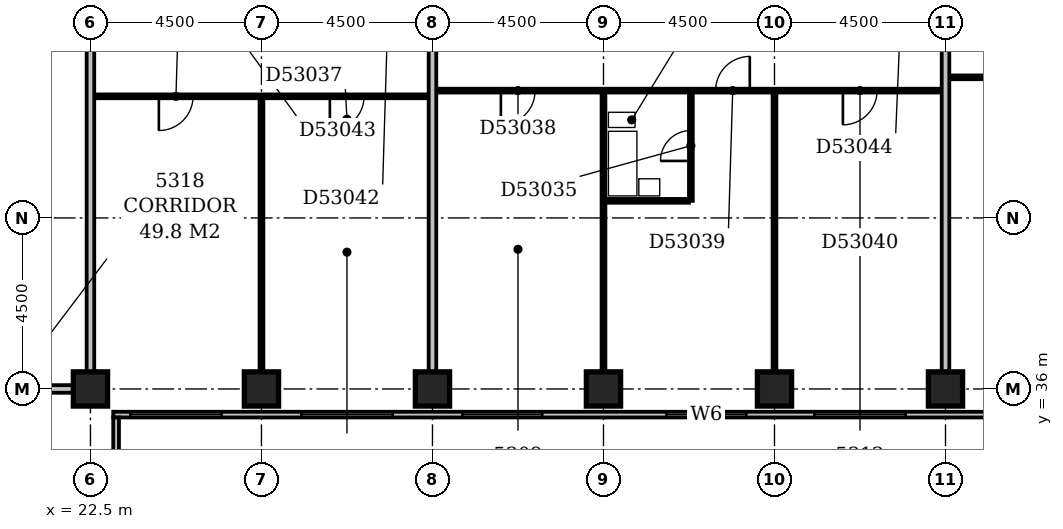
"""IFC4 building model, lengths in metres.
Left out: names, types, materials, properties, quantities, classifications, styles, units other than length and angle.
Written with IfcOpenShell. Run it as: python <this file> out.ifc"""

import sys

from ifc_helpers import new_model, si_unit, direction, frame, frame_2d, origin, origin_2d, place, context, subcontext, project, spatial, rectangle, extrude, element, fill, save


model = new_model("IFC4")
c1 = context("Model", 3, precision=1e-05, world=origin(), true_north=direction((0.0, 1.0)))
c2 = subcontext(c1, "Body", "Model", "MODEL_VIEW")
j1 = project(units=[si_unit("LENGTHUNIT", "METRE"), si_unit("PLANEANGLEUNIT", "RADIAN")], contexts=[c1])
p1 = place(None, origin())
s1 = spatial("IfcSite", under=j1, at=p1, CompositionType="ELEMENT")
p2 = place(p1, origin())
s2 = spatial("IfcBuilding", under=s1, at=p2, CompositionType="ELEMENT")
p3 = place(p2, frame((0.0, 0.0, 207.8)))
s3 = spatial("IfcBuildingStorey", under=s2, at=p3, CompositionType="ELEMENT", Elevation=207.8)
for number, where, z_axis, x_axis in (
    (1, (22.5, 36.0, -0.3), (0.0, 0.0, 1.0), (1.0, 0.0, 0.0)),
    (2, (27.0, 36.0, -0.3), (0.0, 0.0, 1.0), (1.0, 0.0, 0.0)),
    (3, (31.5, 36.0, -0.3), (0.0, 0.0, 1.0), (1.0, 0.0, 0.0)),
    (4, (36.0, 36.0, -0.3), (0.0, 0.0, 1.0), (1.0, 0.0, 0.0)),
    (5, (40.5, 36.0, -0.3), (0.0, 0.0, 1.0), (1.0, 0.0, 0.0)),
    (6, (45.0, 36.0, -0.3), (0.0, 0.0, 1.0), (1.0, 0.0, 0.0)),
):
    element("IfcColumn", number, at=place(p3, frame(where, z_axis=z_axis, x_axis=x_axis)), inside=s3, PredefinedType="COLUMN", context=c2, shape_type="SweptSolid", body=[
        extrude(rectangle(XDim=0.9, YDim=0.9, at=origin_2d()), origin(), (0.0, 0.0, 1.0), 3.55),
    ])
p4 = place(p3, frame((23.175, 17.4, 0.0), z_axis=(0.0, 0.0, 1.0), x_axis=(0.0, 1.0, 0.0)))
e7 = element("IfcWall", 7, at=p4, inside=s3, PredefinedType="STANDARD", context=c2, shape_type="SweptSolid", body=[
    extrude(rectangle(XDim=17.85, YDim=0.15, at=frame_2d((8.925, 0.0))), origin(), (0.0, 0.0, 1.0), 2.7),
])
p5 = place(p4, frame((1.65, 0.0, 0.6)))
e8 = element("IfcOpeningElement", 8, at=p5, cuts=e7, PredefinedType="OPENING", context=c2, shape_type="SweptSolid", body=[
    extrude(rectangle(XDim=2.4, YDim=1.8, at=frame_2d((1.2, 0.9))), frame((0.0, 0.087, 0.0), z_axis=(0.0, -1.0, 0.0), x_axis=(1.0, 0.0, 0.0)), (0.0, 0.0, 1.0), 0.174),
])
p6 = place(p4, frame((6.15, 0.0, 0.6)))
e9 = element("IfcOpeningElement", 9, at=p6, cuts=e7, PredefinedType="OPENING", context=c2, shape_type="SweptSolid", body=[
    extrude(rectangle(XDim=2.4, YDim=1.8, at=frame_2d((1.2, 0.9))), frame((0.0, 0.087, 0.0), z_axis=(0.0, -1.0, 0.0), x_axis=(1.0, 0.0, 0.0)), (0.0, 0.0, 1.0), 0.174),
])
p7 = place(p4, frame((10.65, 0.0, 0.6)))
e10 = element("IfcOpeningElement", 10, at=p7, cuts=e7, PredefinedType="OPENING", context=c2, shape_type="SweptSolid", body=[
    extrude(rectangle(XDim=2.4, YDim=1.8, at=frame_2d((1.2, 0.9))), frame((0.0, 0.087, 0.0), z_axis=(0.0, -1.0, 0.0), x_axis=(1.0, 0.0, 0.0)), (0.0, 0.0, 1.0), 0.174),
])
p8 = place(p4, frame((14.787, 0.0, 0.6)))
e11 = element("IfcOpeningElement", 11, at=p8, cuts=e7, PredefinedType="OPENING", context=c2, shape_type="SweptSolid", body=[
    extrude(rectangle(XDim=0.9, YDim=1.8, at=frame_2d((0.45, 0.9))), frame((0.0, 0.087, 0.0), z_axis=(0.0, -1.0, 0.0), x_axis=(1.0, 0.0, 0.0)), (0.0, 0.0, 1.0), 0.174),
])
p9 = place(p3, frame((23.1, 35.325, 0.0), z_axis=(0.0, 0.0, 1.0), x_axis=(1.0, 0.0, 0.0)))
e12 = element("IfcWall", 12, at=p9, inside=s3, PredefinedType="STANDARD", context=c2, shape_type="SweptSolid", body=[
    extrude(rectangle(XDim=27.15, YDim=0.15, at=frame_2d((13.575, 0.0))), origin(), (0.0, 0.0, 1.0), 2.7),
])
p10 = place(p9, frame((0.45, 0.0, 0.6)))
e13 = element("IfcOpeningElement", 13, at=p10, cuts=e12, PredefinedType="OPENING", context=c2, shape_type="SweptSolid", body=[
    extrude(rectangle(XDim=2.4, YDim=1.8, at=frame_2d((1.2, 0.9))), frame((0.0, 0.087, 0.0), z_axis=(0.0, -1.0, 0.0), x_axis=(1.0, 0.0, 0.0)), (0.0, 0.0, 1.0), 0.174),
])
p11 = place(p9, frame((4.95, 0.0, 0.6)))
e14 = element("IfcOpeningElement", 14, at=p11, cuts=e12, PredefinedType="OPENING", context=c2, shape_type="SweptSolid", body=[
    extrude(rectangle(XDim=2.4, YDim=1.8, at=frame_2d((1.2, 0.9))), frame((0.0, 0.087, 0.0), z_axis=(0.0, -1.0, 0.0), x_axis=(1.0, 0.0, 0.0)), (0.0, 0.0, 1.0), 0.174),
])
p12 = place(p9, frame((9.189, 0.0, 0.6)))
e15 = element("IfcOpeningElement", 15, at=p12, cuts=e12, PredefinedType="OPENING", context=c2, shape_type="SweptSolid", body=[
    extrude(rectangle(XDim=2.1, YDim=1.8, at=frame_2d((1.05, 0.9))), frame((0.0, 0.087, 0.0), z_axis=(0.0, -1.0, 0.0), x_axis=(1.0, 0.0, 0.0)), (0.0, 0.0, 1.0), 0.174),
])
p13 = place(p9, frame((14.558, 0.0, 0.6)))
e16 = element("IfcOpeningElement", 16, at=p13, cuts=e12, PredefinedType="OPENING", context=c2, shape_type="SweptSolid", body=[
    extrude(rectangle(XDim=2.1, YDim=1.8, at=frame_2d((1.05, 0.9))), frame((0.0, 0.087, 0.0), z_axis=(0.0, -1.0, 0.0), x_axis=(1.0, 0.0, 0.0)), (0.0, 0.0, 1.0), 0.174),
])
p14 = place(p9, frame((18.45, 0.0, 0.6)))
e17 = element("IfcOpeningElement", 17, at=p14, cuts=e12, PredefinedType="OPENING", context=c2, shape_type="SweptSolid", body=[
    extrude(rectangle(XDim=2.4, YDim=1.8, at=frame_2d((1.2, 0.9))), frame((0.0, 0.087, 0.0), z_axis=(0.0, -1.0, 0.0), x_axis=(1.0, 0.0, 0.0)), (0.0, 0.0, 1.0), 0.174),
])
p15 = place(p9, frame((22.95, 0.0, 0.6)))
e18 = element("IfcOpeningElement", 18, at=p15, cuts=e12, PredefinedType="OPENING", context=c2, shape_type="SweptSolid", body=[
    extrude(rectangle(XDim=2.4, YDim=1.8, at=frame_2d((1.2, 0.9))), frame((0.0, 0.087, 0.0), z_axis=(0.0, -1.0, 0.0), x_axis=(1.0, 0.0, 0.0)), (0.0, 0.0, 1.0), 0.174),
])
p16 = place(p3, frame((9.1, 36.0, 0.0), z_axis=(0.0, 0.0, 1.0), x_axis=(1.0, 0.0, 0.0)))
e19 = element("IfcWall", 19, at=p16, inside=s3, PredefinedType="PARTITIONING", context=c2, shape_type="SweptSolid", body=[
    extrude(rectangle(XDim=12.95, YDim=0.2, at=frame_2d((6.475, 0.0))), origin(), (0.0, 0.0, 1.0), 3.25),
])
p17 = place(p3, frame((22.5, 36.45, 0.0), z_axis=(0.0, 0.0, 1.0), x_axis=(0.0, 1.0, 0.0)))
e20 = element("IfcWall", 20, at=p17, inside=s3, PredefinedType="PARTITIONING", context=c2, shape_type="SweptSolid", body=[
    extrude(rectangle(XDim=13.05, YDim=0.2, at=frame_2d((6.525, 0.0))), origin(), (0.0, 0.0, 1.0), 3.25),
])
p18 = place(p3, frame((27.0, 36.45, 0.0), z_axis=(0.0, 0.0, 1.0), x_axis=(0.0, 1.0, 0.0)))
e21 = element("IfcWall", 21, at=p18, inside=s3, PredefinedType="PARTITIONING", context=c2, shape_type="SweptSolid", body=[
    extrude(rectangle(XDim=7.2, YDim=0.1, at=frame_2d((3.6, 0.0))), origin(), (0.0, 0.0, 1.0), 2.35),
])
p19 = place(p3, frame((31.5, 36.45, 0.0), z_axis=(0.0, 0.0, 1.0), x_axis=(0.0, 1.0, 0.0)))
e22 = element("IfcWall", 22, at=p19, inside=s3, PredefinedType="PARTITIONING", context=c2, shape_type="SweptSolid", body=[
    extrude(rectangle(XDim=12.95, YDim=0.2, at=frame_2d((6.475, 0.0))), origin(), (0.0, 0.0, 1.0), 3.25),
])
p20 = place(p3, frame((36.0, 36.45, 0.0), z_axis=(0.0, 0.0, 1.0), x_axis=(0.0, 1.0, 0.0)))
e23 = element("IfcWall", 23, at=p20, inside=s3, PredefinedType="PARTITIONING", context=c2, shape_type="SweptSolid", body=[
    extrude(rectangle(XDim=7.35, YDim=0.1, at=frame_2d((3.675, 0.0))), origin(), (0.0, 0.0, 1.0), 2.35),
])
p21 = place(p3, frame((40.5, 36.45, 0.0), z_axis=(0.0, 0.0, 1.0), x_axis=(0.0, 1.0, 0.0)))
e24 = element("IfcWall", 24, at=p21, inside=s3, PredefinedType="PARTITIONING", context=c2, shape_type="SweptSolid", body=[
    extrude(rectangle(XDim=7.35, YDim=0.1, at=frame_2d((3.675, 0.0))), origin(), (0.0, 0.0, 1.0), 3.25),
])
p22 = place(p3, frame((45.0, 36.45, 0.0), z_axis=(0.0, 0.0, 1.0), x_axis=(0.0, 1.0, 0.0)))
e25 = element("IfcWall", 25, at=p22, inside=s3, PredefinedType="PARTITIONING", context=c2, shape_type="SweptSolid", body=[
    extrude(rectangle(XDim=12.95, YDim=0.2, at=frame_2d((6.475, 0.0))), origin(), (0.0, 0.0, 1.0), 2.55),
])
p23 = place(p3, frame((36.05, 40.95, 0.0), z_axis=(0.0, 0.0, 1.0), x_axis=(1.0, 0.0, 0.0)))
e26 = element("IfcWall", 26, at=p23, inside=s3, PredefinedType="PLUMBINGWALL", context=c2, shape_type="SweptSolid", body=[
    extrude(rectangle(XDim=2.2, YDim=0.1, at=frame_2d((1.1, 0.0))), origin(), (0.0, 0.0, 1.0), 3.25),
])
p24 = place(p3, frame((38.3, 40.95, 0.0), z_axis=(0.0, 0.0, 1.0), x_axis=(0.0, 1.0, 0.0)))
e27 = element("IfcWall", 27, at=p24, inside=s3, PredefinedType="PLUMBINGWALL", context=c2, shape_type="SweptSolid", body=[
    extrude(rectangle(XDim=2.85, YDim=0.1, at=frame_2d((1.425, 0.0))), origin(), (0.0, 0.0, 1.0), 3.25),
])
p25 = place(p24, frame((1.05, 0.0, 0.0)))
e28 = element("IfcOpeningElement", 28, at=p25, cuts=e27, PredefinedType="OPENING", context=c2, shape_type="SweptSolid", body=[
    extrude(rectangle(XDim=0.8, YDim=2.1, at=frame_2d((0.4, 1.05))), frame((0.0, 0.062, 0.0), z_axis=(0.0, -1.0, 0.0), x_axis=(1.0, 0.0, 0.0)), (0.0, 0.0, 1.0), 0.124),
])
p26 = place(p3, frame((22.6, 43.7, 0.0), z_axis=(0.0, 0.0, 1.0), x_axis=(1.0, 0.0, 0.0)))
e29 = element("IfcWall", 29, at=p26, inside=s3, PredefinedType="PARTITIONING", context=c2, shape_type="SweptSolid", body=[
    extrude(rectangle(XDim=8.8, YDim=0.1, at=frame_2d((4.4, 0.0))), origin(), (0.0, 0.0, 1.0), 3.25),
])
p27 = place(p26, frame((1.7, 0.0, 0.0)))
e30 = element("IfcOpeningElement", 30, at=p27, cuts=e29, PredefinedType="OPENING", context=c2, shape_type="SweptSolid", body=[
    extrude(rectangle(XDim=0.9, YDim=2.1, at=frame_2d((0.45, 1.05))), frame((0.0, 0.062, 0.0), z_axis=(0.0, -1.0, 0.0), x_axis=(1.0, 0.0, 0.0)), (0.0, 0.0, 1.0), 0.124),
])
p28 = place(p26, frame((6.2, 0.0, 0.0)))
e31 = element("IfcOpeningElement", 31, at=p28, cuts=e29, PredefinedType="OPENING", context=c2, shape_type="SweptSolid", body=[
    extrude(rectangle(XDim=0.9, YDim=2.1, at=frame_2d((0.45, 1.05))), frame((0.0, 0.062, 0.0), z_axis=(0.0, -1.0, 0.0), x_axis=(1.0, 0.0, 0.0)), (0.0, 0.0, 1.0), 0.124),
])
p29 = place(p3, frame((31.6, 43.85, 0.0), z_axis=(0.0, 0.0, 1.0), x_axis=(1.0, 0.0, 0.0)))
e32 = element("IfcWall", 32, at=p29, inside=s3, PredefinedType="PARTITIONING", context=c2, shape_type="SweptSolid", body=[
    extrude(rectangle(XDim=13.3, YDim=0.1, at=frame_2d((6.65, 0.0))), origin(), (0.0, 0.0, 1.0), 3.25),
])
p30 = place(p29, frame((1.7, 0.0, 0.0)))
e33 = element("IfcOpeningElement", 33, at=p30, cuts=e32, PredefinedType="OPENING", context=c2, shape_type="SweptSolid", body=[
    extrude(rectangle(XDim=0.9, YDim=2.1, at=frame_2d((0.45, 1.05))), frame((0.0, 0.062, 0.0), z_axis=(0.0, -1.0, 0.0), x_axis=(1.0, 0.0, 0.0)), (0.0, 0.0, 1.0), 0.124),
])
p31 = place(p29, frame((7.35, 0.0, 0.0)))
e34 = element("IfcOpeningElement", 34, at=p31, cuts=e32, PredefinedType="OPENING", context=c2, shape_type="SweptSolid", body=[
    extrude(rectangle(XDim=0.9, YDim=2.1, at=frame_2d((0.45, 1.05))), frame((0.0, 0.062, 0.0), z_axis=(0.0, -1.0, 0.0), x_axis=(1.0, 0.0, 0.0)), (0.0, 0.0, 1.0), 0.124),
])
p32 = place(p29, frame((10.7, 0.0, 0.0)))
e35 = element("IfcOpeningElement", 35, at=p32, cuts=e32, PredefinedType="OPENING", context=c2, shape_type="SweptSolid", body=[
    extrude(rectangle(XDim=0.9, YDim=2.1, at=frame_2d((0.45, 1.05))), frame((0.0, 0.062, 0.0), z_axis=(0.0, -1.0, 0.0), x_axis=(1.0, 0.0, 0.0)), (0.0, 0.0, 1.0), 0.124),
])
p33 = place(p3, frame((45.1, 44.2, 0.0), z_axis=(0.0, 0.0, 1.0), x_axis=(1.0, 0.0, 0.0)))
e36 = element("IfcWall", 36, at=p33, inside=s3, PredefinedType="PARTITIONING", context=c2, shape_type="SweptSolid", body=[
    extrude(rectangle(XDim=9.5, YDim=0.1, at=frame_2d((4.75, 0.0))), origin(), (0.0, 0.0, 1.0), 3.25),
])
p34 = place(p33, frame((3.95, 0.0, 0.0)))
e37 = element("IfcOpeningElement", 37, at=p34, cuts=e36, PredefinedType="OPENING", context=c2, shape_type="SweptSolid", body=[
    extrude(rectangle(XDim=0.9, YDim=2.1, at=frame_2d((0.45, 1.05))), frame((0.0, 0.062, 0.0), z_axis=(0.0, -1.0, 0.0), x_axis=(1.0, 0.0, 0.0)), (0.0, 0.0, 1.0), 0.124),
])
p35 = place(p10, origin())
e38 = element("IfcWindow", 38, at=p35, inside=s3, PartitioningType="SINGLE_PANEL", PredefinedType="WINDOW", context=c2, shape_type="SweptSolid", body=[
    extrude(rectangle(XDim=2.4, YDim=1.8, at=frame_2d((1.2, 0.9))), frame((0.0, 0.03, 0.0), z_axis=(0.0, -1.0, 0.0), x_axis=(1.0, 0.0, 0.0)), (0.0, 0.0, 1.0), 0.06),
])
fill(e13, e38)
p36 = place(p11, origin())
e39 = element("IfcWindow", 39, at=p36, inside=s3, PartitioningType="SINGLE_PANEL", PredefinedType="WINDOW", context=c2, shape_type="SweptSolid", body=[
    extrude(rectangle(XDim=2.4, YDim=1.8, at=frame_2d((1.2, 0.9))), frame((0.0, 0.03, 0.0), z_axis=(0.0, -1.0, 0.0), x_axis=(1.0, 0.0, 0.0)), (0.0, 0.0, 1.0), 0.06),
])
fill(e14, e39)
p37 = place(p12, origin())
e40 = element("IfcWindow", 40, at=p37, inside=s3, PartitioningType="SINGLE_PANEL", PredefinedType="WINDOW", context=c2, shape_type="SweptSolid", body=[
    extrude(rectangle(XDim=2.1, YDim=1.8, at=frame_2d((1.05, 0.9))), frame((0.0, 0.03, 0.0), z_axis=(0.0, -1.0, 0.0), x_axis=(1.0, 0.0, 0.0)), (0.0, 0.0, 1.0), 0.06),
])
fill(e15, e40)
p38 = place(p13, origin())
e41 = element("IfcWindow", 41, at=p38, inside=s3, PartitioningType="SINGLE_PANEL", PredefinedType="WINDOW", context=c2, shape_type="SweptSolid", body=[
    extrude(rectangle(XDim=2.1, YDim=1.8, at=frame_2d((1.05, 0.9))), frame((0.0, 0.03, 0.0), z_axis=(0.0, -1.0, 0.0), x_axis=(1.0, 0.0, 0.0)), (0.0, 0.0, 1.0), 0.06),
])
fill(e16, e41)
p39 = place(p14, origin())
e42 = element("IfcWindow", 42, at=p39, inside=s3, PartitioningType="SINGLE_PANEL", PredefinedType="WINDOW", context=c2, shape_type="SweptSolid", body=[
    extrude(rectangle(XDim=2.4, YDim=1.8, at=frame_2d((1.2, 0.9))), frame((0.0, 0.03, 0.0), z_axis=(0.0, -1.0, 0.0), x_axis=(1.0, 0.0, 0.0)), (0.0, 0.0, 1.0), 0.06),
])
fill(e17, e42)
p40 = place(p25, origin())
e43 = element("IfcDoor", 43, at=p40, inside=s3, OperationType="SINGLE_SWING_LEFT", PredefinedType="DOOR", context=c2, shape_type="SweptSolid", body=[
    extrude(rectangle(XDim=0.8, YDim=2.1, at=frame_2d((0.4, 1.05))), frame((0.0, 0.025, 0.0), z_axis=(0.0, -1.0, 0.0), x_axis=(1.0, 0.0, 0.0)), (0.0, 0.0, 1.0), 0.05),
])
fill(e28, e43)
p41 = place(p27, frame((0.9, 0.0, 0.0), z_axis=(0.0, 0.0, 1.0), x_axis=(-1.0, 0.0, 0.0)))
e44 = element("IfcDoor", 44, at=p41, inside=s3, OperationType="SINGLE_SWING_RIGHT", PredefinedType="DOOR", context=c2, shape_type="SweptSolid", body=[
    extrude(rectangle(XDim=0.9, YDim=2.1, at=frame_2d((0.45, 1.05))), frame((0.0, 0.025, 0.0), z_axis=(0.0, -1.0, 0.0), x_axis=(1.0, 0.0, 0.0)), (0.0, 0.0, 1.0), 0.05),
])
fill(e30, e44)
p42 = place(p28, frame((0.9, 0.0, 0.0), z_axis=(0.0, 0.0, 1.0), x_axis=(-1.0, 0.0, 0.0)))
e45 = element("IfcDoor", 45, at=p42, inside=s3, OperationType="SINGLE_SWING_RIGHT", PredefinedType="DOOR", context=c2, shape_type="SweptSolid", body=[
    extrude(rectangle(XDim=0.9, YDim=2.1, at=frame_2d((0.45, 1.05))), frame((0.0, 0.025, 0.0), z_axis=(0.0, -1.0, 0.0), x_axis=(1.0, 0.0, 0.0)), (0.0, 0.0, 1.0), 0.05),
])
fill(e31, e45)
p43 = place(p30, frame((0.9, 0.0, 0.0), z_axis=(0.0, 0.0, 1.0), x_axis=(-1.0, 0.0, 0.0)))
e46 = element("IfcDoor", 46, at=p43, inside=s3, OperationType="SINGLE_SWING_RIGHT", PredefinedType="DOOR", context=c2, shape_type="SweptSolid", body=[
    extrude(rectangle(XDim=0.9, YDim=2.1, at=frame_2d((0.45, 1.05))), frame((0.0, 0.025, 0.0), z_axis=(0.0, -1.0, 0.0), x_axis=(1.0, 0.0, 0.0)), (0.0, 0.0, 1.0), 0.05),
])
fill(e33, e46)
p44 = place(p31, frame((0.9, 0.0, 0.0), z_axis=(0.0, 0.0, 1.0), x_axis=(-1.0, 0.0, 0.0)))
e47 = element("IfcDoor", 47, at=p44, inside=s3, OperationType="SINGLE_SWING_LEFT", PredefinedType="DOOR", context=c2, shape_type="SweptSolid", body=[
    extrude(rectangle(XDim=0.9, YDim=2.1, at=frame_2d((0.45, 1.05))), frame((0.0, 0.025, 0.0), z_axis=(0.0, -1.0, 0.0), x_axis=(1.0, 0.0, 0.0)), (0.0, 0.0, 1.0), 0.05),
])
fill(e34, e47)
p45 = place(p32, frame((0.9, 0.0, 0.0), z_axis=(0.0, 0.0, 1.0), x_axis=(-1.0, 0.0, 0.0)))
e48 = element("IfcDoor", 48, at=p45, inside=s3, OperationType="SINGLE_SWING_RIGHT", PredefinedType="DOOR", context=c2, shape_type="SweptSolid", body=[
    extrude(rectangle(XDim=0.9, YDim=2.1, at=frame_2d((0.45, 1.05))), frame((0.0, 0.025, 0.0), z_axis=(0.0, -1.0, 0.0), x_axis=(1.0, 0.0, 0.0)), (0.0, 0.0, 1.0), 0.05),
])
fill(e35, e48)
save(model, sys.argv[1])
